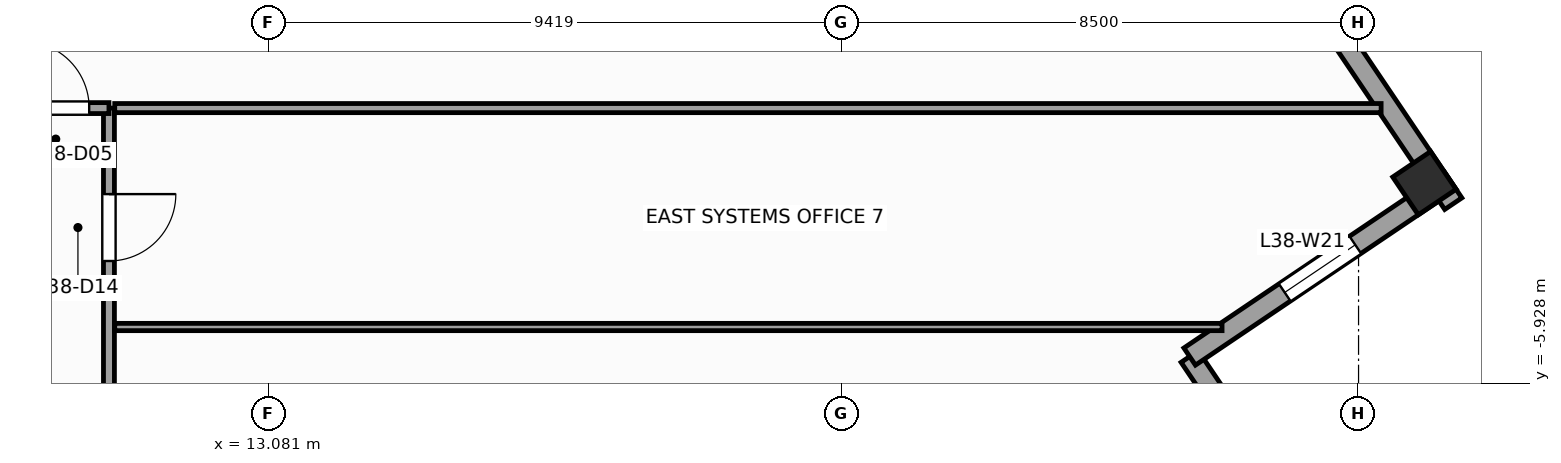
"""IFC4 building model, lengths in metres.
Left out: names, types, materials, properties, quantities, classifications, styles, units other than length and angle.
Written with IfcOpenShell. Run it as: python <this file> out.ifc"""

import sys

from ifc_helpers import new_model, si_unit, direction, frame, frame_2d, origin, origin_2d, place, context, subcontext, project, spatial, rectangle, extrude, source, transform, mapped, element, fill, save


model = new_model("IFC4")
c1 = context("Model", 3, precision=1e-05, world=origin(), true_north=direction((0.0, 1.0)))
c2 = subcontext(c1, "Body", "Model", "MODEL_VIEW")
j1 = project(units=[si_unit("LENGTHUNIT", "METRE"), si_unit("PLANEANGLEUNIT", "RADIAN")], contexts=[c1])
p1 = place(None, origin())
s1 = spatial("IfcSite", under=j1, at=p1, CompositionType="ELEMENT")
p2 = place(p1, origin())
s2 = spatial("IfcBuilding", under=s1, at=p2, CompositionType="ELEMENT")
p3 = place(p2, frame((0.0, 0.0, 160.4)))
s3 = spatial("IfcBuildingStorey", under=s2, at=p3, CompositionType="ELEMENT", Elevation=160.4)
m1 = source(origin(), c2, "Body", "SweptSolid", [
    extrude(rectangle(XDim=0.75, YDim=0.75, at=origin_2d()), origin(), (0.0, 0.0, 1.0), 4.0),
])
p4 = place(p3, frame((32.083, -2.635, 0.0), z_axis=(0.0, 0.0, 1.0), x_axis=(0.829037572555, 0.559192903471, 0.0)))
e1 = element("IfcColumn", 1, at=p4, inside=s3, PredefinedType="COLUMN", context=c2, shape_type="MappedRepresentation", body=[
    mapped(m1, transform((0.0, 0.0, 0.0), scale=1.0)),
])
p5 = place(p3, frame((31.019, -9.631, 0.0), z_axis=(0.0, 0.0, 1.0), x_axis=(-0.559210350234, 0.829025804298, 0.0)))
e2 = element("IfcWall", 2, at=p5, inside=s3, PredefinedType="STANDARD", context=c2, shape_type="SweptSolid", body=[
    extrude(rectangle(XDim=5.0, YDim=0.34, at=frame_2d((2.5, 0.0))), origin(), (0.0, 0.0, 1.0), 3.74),
])
p6 = place(p3, frame((28.223, -5.486, 0.0), z_axis=(0.0, 0.0, 1.0), x_axis=(0.82905227345, 0.559171107879, 0.0)))
e3 = element("IfcWall", 3, at=p6, inside=s3, PredefinedType="STANDARD", context=c2, shape_type="SweptSolid", body=[
    extrude(rectangle(XDim=5.17, YDim=0.34, at=frame_2d((2.585, 0.0))), origin(), (0.0, 0.0, 1.0), 3.04),
])
p7 = place(p6, frame((1.885, 0.0, 0.56)))
e4 = element("IfcOpeningElement", 4, at=p7, cuts=e3, PredefinedType="OPENING", context=c2, shape_type="SweptSolid", body=[
    extrude(rectangle(XDim=1.4, YDim=2.4, at=frame_2d((0.7, 1.2))), frame((0.0, 0.18, 0.0), z_axis=(0.0, -1.0, 0.0), x_axis=(1.0, 0.0, 0.0)), (0.0, 0.0, 1.0), 0.36),
])
p8 = place(p3, frame((32.558, -2.972, 0.0), z_axis=(0.0, 0.0, 1.0), x_axis=(-0.559194910251, 0.829036218961, 0.0)))
e5 = element("IfcWall", 5, at=p8, inside=s3, PredefinedType="STANDARD", context=c2, shape_type="SweptSolid", body=[
    extrude(rectangle(XDim=41.34, YDim=0.34, at=frame_2d((20.67, 0.0))), origin(), (0.0, 0.0, 1.0), 3.04),
])
p9 = place(p8, frame((4.261, 0.0, 0.56)))
e6 = element("IfcOpeningElement", 6, at=p9, cuts=e5, PredefinedType="OPENING", context=c2, shape_type="SweptSolid", body=[
    extrude(rectangle(XDim=1.4, YDim=2.4, at=frame_2d((0.7, 1.2))), frame((0.0, 0.18, 0.0), z_axis=(0.0, -1.0, 0.0), x_axis=(1.0, 0.0, 0.0)), (0.0, 0.0, 1.0), 0.36),
])
p10 = place(p8, frame((11.064, 0.0, 0.61)))
e7 = element("IfcOpeningElement", 7, at=p10, cuts=e5, PredefinedType="OPENING", context=c2, shape_type="SweptSolid", body=[
    extrude(rectangle(XDim=1.85, YDim=2.35, at=frame_2d((0.925, 1.175))), frame((0.0, 0.18, 0.0), z_axis=(0.0, -1.0, 0.0), x_axis=(1.0, 0.0, 0.0)), (0.0, 0.0, 1.0), 0.36),
])
p11 = place(p8, frame((18.168, 0.0, 0.61)))
e8 = element("IfcOpeningElement", 8, at=p11, cuts=e5, PredefinedType="OPENING", context=c2, shape_type="SweptSolid", body=[
    extrude(rectangle(XDim=1.85, YDim=2.35, at=frame_2d((0.925, 1.175))), frame((0.0, 0.18, 0.0), z_axis=(0.0, -1.0, 0.0), x_axis=(1.0, 0.0, 0.0)), (0.0, 0.0, 1.0), 0.36),
])
p12 = place(p8, frame((27.186, 0.0, 0.61)))
e9 = element("IfcOpeningElement", 9, at=p12, cuts=e5, PredefinedType="OPENING", context=c2, shape_type="SweptSolid", body=[
    extrude(rectangle(XDim=1.85, YDim=2.35, at=frame_2d((0.925, 1.175))), frame((0.0, 0.18, 0.0), z_axis=(0.0, -1.0, 0.0), x_axis=(1.0, 0.0, 0.0)), (0.0, 0.0, 1.0), 0.36),
])
p13 = place(p8, frame((34.852, 0.0, 0.56)))
e10 = element("IfcOpeningElement", 10, at=p13, cuts=e5, PredefinedType="OPENING", context=c2, shape_type="SweptSolid", body=[
    extrude(rectangle(XDim=1.4, YDim=2.4, at=frame_2d((0.7, 1.2))), frame((0.0, 0.18, 0.0), z_axis=(0.0, -1.0, 0.0), x_axis=(1.0, 0.0, 0.0)), (0.0, 0.0, 1.0), 0.36),
])
p14 = place(p3, frame((10.45, -11.45, 0.0), z_axis=(0.0, 0.0, 1.0), x_axis=(0.0, 1.0, 0.0)))
e11 = element("IfcWall", 11, at=p14, inside=s3, PredefinedType="PARTITIONING", context=c2, shape_type="SweptSolid", body=[
    extrude(rectangle(XDim=10.05, YDim=0.18, at=frame_2d((5.025, 0.0))), origin(), (0.0, 0.0, 1.0), 3.74),
])
p15 = place(p14, frame((4.3, 0.0, 0.0)))
e12 = element("IfcOpeningElement", 12, at=p15, cuts=e11, PredefinedType="OPENING", context=c2, shape_type="SweptSolid", body=[
    extrude(rectangle(XDim=1.1, YDim=2.2, at=frame_2d((0.55, 1.1))), frame((0.0, 0.1, 0.0), z_axis=(0.0, -1.0, 0.0), x_axis=(1.0, 0.0, 0.0)), (0.0, 0.0, 1.0), 0.2),
])
p16 = place(p14, frame((7.536, 0.0, 0.0)))
e13 = element("IfcOpeningElement", 13, at=p16, cuts=e11, PredefinedType="OPENING", context=c2, shape_type="SweptSolid", body=[
    extrude(rectangle(XDim=1.1, YDim=2.2, at=frame_2d((0.55, 1.1))), frame((0.0, 0.1, 0.0), z_axis=(0.0, -1.0, 0.0), x_axis=(1.0, 0.0, 0.0)), (0.0, 0.0, 1.0), 0.2),
])
p17 = place(p3, frame((8.7, -1.4, 0.0), z_axis=(0.0, 0.0, 1.0), x_axis=(1.0, 0.0, 0.0)))
e14 = element("IfcWall", 14, at=p17, inside=s3, PredefinedType="PARTITIONING", context=c2, shape_type="SweptSolid", body=[
    extrude(rectangle(XDim=1.75, YDim=0.18, at=frame_2d((0.875, 0.0))), origin(), (0.0, 0.0, 1.0), 3.74),
])
p18 = place(p17, frame((0.325, 0.0, 0.0)))
e15 = element("IfcOpeningElement", 15, at=p18, cuts=e14, PredefinedType="OPENING", context=c2, shape_type="SweptSolid", body=[
    extrude(rectangle(XDim=1.1, YDim=2.2, at=frame_2d((0.55, 1.1))), frame((0.0, 0.1, 0.0), z_axis=(0.0, -1.0, 0.0), x_axis=(1.0, 0.0, 0.0)), (0.0, 0.0, 1.0), 0.2),
])
p19 = place(p3, frame((10.545, -1.4, 0.0), z_axis=(0.0, 0.0, 1.0), x_axis=(1.0, 0.0, 0.0)))
e16 = element("IfcWall", 16, at=p19, inside=s3, PredefinedType="PARTITIONING", context=c2, shape_type="SweptSolid", body=[
    extrude(rectangle(XDim=20.826, YDim=0.15, at=frame_2d((10.413, 0.0))), origin(), (0.0, 0.0, 1.0), 3.74),
])
p20 = place(p3, frame((10.545, -5.0, 0.0), z_axis=(0.0, 0.0, 1.0), x_axis=(1.0, 0.0, 0.0)))
e17 = element("IfcWall", 17, at=p20, inside=s3, PredefinedType="PARTITIONING", context=c2, shape_type="SweptSolid", body=[
    extrude(rectangle(XDim=18.21, YDim=0.12, at=frame_2d((9.105, 0.0))), origin(), (0.0, 0.0, 1.0), 3.74),
])
m2 = source(origin(), c2, "Body", "SweptSolid", [
    extrude(rectangle(XDim=1.4, YDim=2.4, at=frame_2d((0.7, 1.2))), frame((0.0, 0.03, 0.0), z_axis=(0.0, -1.0, 0.0), x_axis=(1.0, 0.0, 0.0)), (0.0, 0.0, 1.0), 0.06),
])
p21 = place(p7, origin())
e18 = element("IfcWindow", 18, at=p21, inside=s3, PartitioningType="SINGLE_PANEL", PredefinedType="WINDOW", context=c2, shape_type="MappedRepresentation", body=[
    mapped(m2, transform((0.0, 0.0, 0.0), scale=1.0)),
])
fill(e4, e18)
m3 = source(origin(), c2, "Body", "SweptSolid", [
    extrude(rectangle(XDim=1.1, YDim=2.2, at=frame_2d((0.55, 1.1))), frame((0.0, 0.025, 0.0), z_axis=(0.0, -1.0, 0.0), x_axis=(1.0, 0.0, 0.0)), (0.0, 0.0, 1.0), 0.05),
])
p22 = place(p18, origin())
e19 = element("IfcDoor", 19, at=p22, inside=s3, OperationType="SINGLE_SWING_LEFT", PredefinedType="DOOR", context=c2, shape_type="MappedRepresentation", body=[
    mapped(m3, transform((0.0, 0.0, 0.0), scale=1.0)),
])
fill(e15, e19)
p23 = place(p16, frame((1.1, 0.0, 0.0), z_axis=(0.0, 0.0, 1.0), x_axis=(-1.0, 0.0, 0.0)))
e20 = element("IfcDoor", 20, at=p23, inside=s3, OperationType="SINGLE_SWING_RIGHT", PredefinedType="DOOR", context=c2, shape_type="MappedRepresentation", body=[
    mapped(m3, transform((0.0, 0.0, 0.0), scale=1.0)),
])
fill(e13, e20)
save(model, sys.argv[1])
